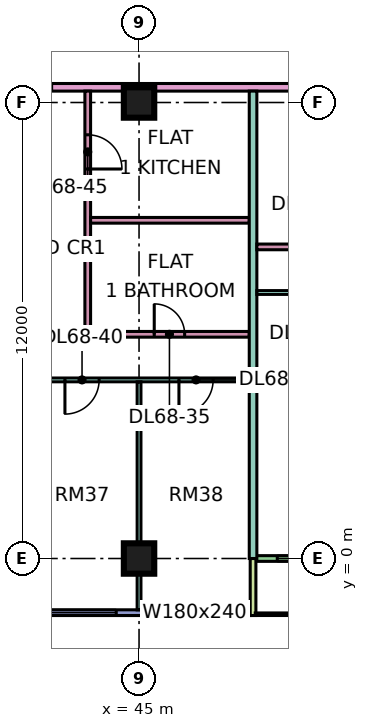
"""IFC4 building model, lengths in metres.
Left out: names, types, materials, properties, quantities, classifications, styles, units other than length and angle.
Written with IfcOpenShell. Run it as: python <this file> out.ifc"""

import sys

from ifc_helpers import new_model, si_unit, direction, frame, frame_2d, origin, origin_2d, place, context, subcontext, project, spatial, rectangle, extrude, element, fill, save


model = new_model("IFC4")
c1 = context("Model", 3, precision=1e-05, world=origin(), true_north=direction((0.0, 1.0)))
c2 = subcontext(c1, "Body", "Model", "MODEL_VIEW")
j1 = project(units=[si_unit("LENGTHUNIT", "METRE"), si_unit("PLANEANGLEUNIT", "RADIAN")], contexts=[c1])
p1 = place(None, origin())
s1 = spatial("IfcSite", under=j1, at=p1, CompositionType="ELEMENT")
p2 = place(p1, origin())
s2 = spatial("IfcBuilding", under=s1, at=p2, CompositionType="ELEMENT")
p3 = place(p2, frame((0.0, 0.0, 292.15)))
s3 = spatial("IfcBuildingStorey", under=s2, at=p3, CompositionType="ELEMENT", Elevation=292.15)
for number, where, z_axis, x_axis in (
    (1, (45.0, 0.0, 0.0), (0.0, 0.0, 1.0), (1.0, 0.0, 0.0)),
    (2, (45.0, 12.0, 0.0), (0.0, 0.0, 1.0), (1.0, 0.0, 0.0)),
):
    element("IfcColumn", number, at=place(p3, frame(where, z_axis=z_axis, x_axis=x_axis)), inside=s3, PredefinedType="COLUMN", context=c2, shape_type="SweptSolid", body=[
        extrude(rectangle(XDim=0.8, YDim=0.8, at=origin_2d()), origin(), (0.0, 0.0, 1.0), 3.75),
    ])
p4 = place(p3, frame((36.075, -1.425, 0.0), z_axis=(0.0, 0.0, 1.0), x_axis=(1.0, 0.0, 0.0)))
e3 = element("IfcWall", 3, at=p4, inside=s3, PredefinedType="SOLIDWALL", context=c2, shape_type="SweptSolid", body=[
    extrude(rectangle(XDim=11.85, YDim=0.15, at=frame_2d((5.925, 0.0))), origin(), (0.0, 0.0, 1.0), 3.35),
])
p5 = place(p4, frame((1.462, 0.0, 0.45)))
e4 = element("IfcOpeningElement", 4, at=p5, cuts=e3, PredefinedType="OPENING", context=c2, shape_type="SweptSolid", body=[
    extrude(rectangle(XDim=3.0, YDim=2.4, at=frame_2d((1.5, 1.2))), frame((0.0, 0.085, 0.0), z_axis=(0.0, -1.0, 0.0), x_axis=(1.0, 0.0, 0.0)), (0.0, 0.0, 1.0), 0.17),
])
p6 = place(p4, frame((6.525, 0.0, 0.45)))
e5 = element("IfcOpeningElement", 5, at=p6, cuts=e3, PredefinedType="OPENING", context=c2, shape_type="SweptSolid", body=[
    extrude(rectangle(XDim=1.8, YDim=2.4, at=frame_2d((0.9, 1.2))), frame((0.0, 0.085, 0.0), z_axis=(0.0, -1.0, 0.0), x_axis=(1.0, 0.0, 0.0)), (0.0, 0.0, 1.0), 0.17),
])
p7 = place(p4, frame((9.488, 0.0, 0.45)))
e6 = element("IfcOpeningElement", 6, at=p7, cuts=e3, PredefinedType="OPENING", context=c2, shape_type="SweptSolid", body=[
    extrude(rectangle(XDim=1.8, YDim=2.4, at=frame_2d((0.9, 1.2))), frame((0.0, 0.085, 0.0), z_axis=(0.0, -1.0, 0.0), x_axis=(1.0, 0.0, 0.0)), (0.0, 0.0, 1.0), 0.17),
])
p8 = place(p3, frame((48.075, 0.0, 0.0), z_axis=(0.0, 0.0, 1.0), x_axis=(1.0, 0.0, 0.0)))
e7 = element("IfcWall", 7, at=p8, inside=s3, PredefinedType="SOLIDWALL", context=c2, shape_type="SweptSolid", body=[
    extrude(rectangle(XDim=13.35, YDim=0.15, at=frame_2d((6.675, 0.0))), origin(), (0.0, 0.0, 1.0), 3.35),
])
p9 = place(p8, frame((0.562, 0.0, 0.45)))
e8 = element("IfcOpeningElement", 8, at=p9, cuts=e7, PredefinedType="OPENING", context=c2, shape_type="SweptSolid", body=[
    extrude(rectangle(XDim=1.8, YDim=2.4, at=frame_2d((0.9, 1.2))), frame((0.0, 0.085, 0.0), z_axis=(0.0, -1.0, 0.0), x_axis=(1.0, 0.0, 0.0)), (0.0, 0.0, 1.0), 0.17),
])
p10 = place(p8, frame((3.275, 0.0, 0.45)))
e9 = element("IfcOpeningElement", 9, at=p10, cuts=e7, PredefinedType="OPENING", context=c2, shape_type="SweptSolid", body=[
    extrude(rectangle(XDim=1.8, YDim=2.4, at=frame_2d((0.9, 1.2))), frame((0.0, 0.085, 0.0), z_axis=(0.0, -1.0, 0.0), x_axis=(1.0, 0.0, 0.0)), (0.0, 0.0, 1.0), 0.17),
])
p11 = place(p8, frame((8.275, 0.0, 0.0)))
e10 = element("IfcOpeningElement", 10, at=p11, cuts=e7, PredefinedType="OPENING", context=c2, shape_type="SweptSolid", body=[
    extrude(rectangle(XDim=1.8, YDim=2.4, at=frame_2d((0.9, 1.2))), frame((0.0, 0.085, 0.0), z_axis=(0.0, -1.0, 0.0), x_axis=(1.0, 0.0, 0.0)), (0.0, 0.0, 1.0), 0.17),
])
p12 = place(p8, frame((12.188, 0.0, 0.45)))
e11 = element("IfcOpeningElement", 11, at=p12, cuts=e7, PredefinedType="OPENING", context=c2, shape_type="SweptSolid", body=[
    extrude(rectangle(XDim=0.9, YDim=2.4, at=frame_2d((0.45, 1.2))), frame((0.0, 0.085, 0.0), z_axis=(0.0, -1.0, 0.0), x_axis=(1.0, 0.0, 0.0)), (0.0, 0.0, 1.0), 0.17),
])
p13 = place(p3, frame((48.0, -1.5, 0.0), z_axis=(0.0, 0.0, 1.0), x_axis=(0.0, 1.0, 0.0)))
e12 = element("IfcWall", 12, at=p13, inside=s3, PredefinedType="SOLIDWALL", context=c2, shape_type="SweptSolid", body=[
    extrude(rectangle(XDim=1.5, YDim=0.15, at=frame_2d((0.75, 0.0))), origin(), (0.0, 0.0, 1.0), 3.35),
])
p14 = place(p3, frame((33.05, 4.7, 0.0), z_axis=(0.0, 0.0, 1.0), x_axis=(1.0, 0.0, 0.0)))
e13 = element("IfcWall", 13, at=p14, inside=s3, PredefinedType="PARTITIONING", context=c2, shape_type="SweptSolid", body=[
    extrude(rectangle(XDim=14.85, YDim=0.1, at=frame_2d((7.425, 0.0))), origin(), (0.0, 0.0, 1.0), 3.35),
])
p15 = place(p14, frame((10.0, 0.0, 0.0)))
e14 = element("IfcOpeningElement", 14, at=p15, cuts=e13, PredefinedType="OPENING", context=c2, shape_type="SweptSolid", body=[
    extrude(rectangle(XDim=0.9, YDim=2.1, at=frame_2d((0.45, 1.05))), frame((0.0, 0.06, 0.0), z_axis=(0.0, -1.0, 0.0), x_axis=(1.0, 0.0, 0.0)), (0.0, 0.0, 1.0), 0.12),
])
p16 = place(p14, frame((13.0, 0.0, 0.0)))
e15 = element("IfcOpeningElement", 15, at=p16, cuts=e13, PredefinedType="OPENING", context=c2, shape_type="SweptSolid", body=[
    extrude(rectangle(XDim=0.9, YDim=2.1, at=frame_2d((0.45, 1.05))), frame((0.0, 0.06, 0.0), z_axis=(0.0, -1.0, 0.0), x_axis=(1.0, 0.0, 0.0)), (0.0, 0.0, 1.0), 0.12),
])
p17 = place(p14, frame((4.0, 0.0, 0.0)))
e16 = element("IfcOpeningElement", 16, at=p17, cuts=e13, PredefinedType="OPENING", context=c2, shape_type="SweptSolid", body=[
    extrude(rectangle(XDim=0.9, YDim=2.1, at=frame_2d((0.45, 1.05))), frame((0.0, 0.06, 0.0), z_axis=(0.0, -1.0, 0.0), x_axis=(1.0, 0.0, 0.0)), (0.0, 0.0, 1.0), 0.12),
])
p18 = place(p3, frame((40.65, 12.4, 0.0), z_axis=(0.0, 0.0, 1.0), x_axis=(1.0, 0.0, 0.0)))
e17 = element("IfcWall", 17, at=p18, inside=s3, PredefinedType="PARTITIONING", context=c2, shape_type="SweptSolid", body=[
    extrude(rectangle(XDim=22.35, YDim=0.2, at=frame_2d((11.175, 0.0))), origin(), (0.0, 0.0, 1.0), 3.35),
])
p19 = place(p18, frame((20.25, 0.0, 0.0)))
e18 = element("IfcOpeningElement", 18, at=p19, cuts=e17, PredefinedType="OPENING", context=c2, shape_type="SweptSolid", body=[
    extrude(rectangle(XDim=1.0, YDim=2.1, at=frame_2d((0.5, 1.05))), frame((0.0, 0.11, 0.0), z_axis=(0.0, -1.0, 0.0), x_axis=(1.0, 0.0, 0.0)), (0.0, 0.0, 1.0), 0.22),
])
p20 = place(p18, frame((1.05, 0.0, 0.0)))
e19 = element("IfcOpeningElement", 19, at=p20, cuts=e17, PredefinedType="OPENING", context=c2, shape_type="SweptSolid", body=[
    extrude(rectangle(XDim=1.0, YDim=2.1, at=frame_2d((0.5, 1.05))), frame((0.0, 0.11, 0.0), z_axis=(0.0, -1.0, 0.0), x_axis=(1.0, 0.0, 0.0)), (0.0, 0.0, 1.0), 0.22),
])
p21 = place(p3, frame((43.65, 5.825, 0.0), z_axis=(0.0, 0.0, 1.0), x_axis=(0.0, 1.0, 0.0)))
e20 = element("IfcWall", 20, at=p21, inside=s3, PredefinedType="PARTITIONING", context=c2, shape_type="SweptSolid", body=[
    extrude(rectangle(XDim=6.475, YDim=0.15, at=frame_2d((3.238, 0.0))), origin(), (0.0, 0.0, 1.0), 3.35),
])
p22 = place(p21, frame((4.425, 0.0, 0.0)))
e21 = element("IfcOpeningElement", 21, at=p22, cuts=e20, PredefinedType="OPENING", context=c2, shape_type="SweptSolid", body=[
    extrude(rectangle(XDim=0.9, YDim=2.1, at=frame_2d((0.45, 1.05))), frame((0.0, 0.085, 0.0), z_axis=(0.0, -1.0, 0.0), x_axis=(1.0, 0.0, 0.0)), (0.0, 0.0, 1.0), 0.17),
])
p23 = place(p3, frame((43.725, 5.9, 0.0), z_axis=(0.0, 0.0, 1.0), x_axis=(1.0, 0.0, 0.0)))
e22 = element("IfcWall", 22, at=p23, inside=s3, PredefinedType="PARTITIONING", context=c2, shape_type="SweptSolid", body=[
    extrude(rectangle(XDim=4.175, YDim=0.15, at=frame_2d((2.087, 0.0))), origin(), (0.0, 0.0, 1.0), 3.35),
])
p24 = place(p23, frame((1.675, 0.0, 0.0)))
e23 = element("IfcOpeningElement", 23, at=p24, cuts=e22, PredefinedType="OPENING", context=c2, shape_type="SweptSolid", body=[
    extrude(rectangle(XDim=0.8, YDim=2.1, at=frame_2d((0.4, 1.05))), frame((0.0, 0.085, 0.0), z_axis=(0.0, -1.0, 0.0), x_axis=(1.0, 0.0, 0.0)), (0.0, 0.0, 1.0), 0.17),
])
p25 = place(p3, frame((43.725, 8.9, 0.0), z_axis=(0.0, 0.0, 1.0), x_axis=(1.0, 0.0, 0.0)))
e24 = element("IfcWall", 24, at=p25, inside=s3, PredefinedType="PARTITIONING", context=c2, shape_type="SweptSolid", body=[
    extrude(rectangle(XDim=4.175, YDim=0.15, at=frame_2d((2.087, 0.0))), origin(), (0.0, 0.0, 1.0), 3.35),
])
p26 = place(p3, frame((45.0, -1.351, 0.0), z_axis=(0.0, 0.0, 1.0), x_axis=(0.0, 1.0, 0.0)))
e25 = element("IfcWall", 25, at=p26, inside=s3, PredefinedType="PARTITIONING", context=c2, shape_type="SweptSolid", body=[
    extrude(rectangle(XDim=6.001, YDim=0.1, at=frame_2d((3.0, 0.0))), origin(), (0.0, 0.0, 1.0), 3.35),
])
p27 = place(p3, frame((48.0, 0.0, 0.0), z_axis=(0.0, 0.0, 1.0), x_axis=(0.0, 1.0, 0.0)))
e26 = element("IfcWall", 26, at=p27, inside=s3, PredefinedType="PARTITIONING", context=c2, shape_type="SweptSolid", body=[
    extrude(rectangle(XDim=12.3, YDim=0.2, at=frame_2d((6.15, 0.0))), origin(), (0.0, 0.0, 1.0), 3.35),
])
p28 = place(p3, frame((48.1, 7.0, 0.0), z_axis=(0.0, 0.0, 1.0), x_axis=(1.0, 0.0, 0.0)))
e27 = element("IfcWall", 27, at=p28, inside=s3, PredefinedType="PARTITIONING", context=c2, shape_type="SweptSolid", body=[
    extrude(rectangle(XDim=5.85, YDim=0.1, at=frame_2d((2.925, 0.0))), origin(), (0.0, 0.0, 1.0), 3.35),
])
p29 = place(p28, frame((0.95, 0.0, 0.0)))
e28 = element("IfcOpeningElement", 28, at=p29, cuts=e27, PredefinedType="OPENING", context=c2, shape_type="SweptSolid", body=[
    extrude(rectangle(XDim=0.9, YDim=2.1, at=frame_2d((0.45, 1.05))), frame((0.0, 0.06, 0.0), z_axis=(0.0, -1.0, 0.0), x_axis=(1.0, 0.0, 0.0)), (0.0, 0.0, 1.0), 0.12),
])
p30 = place(p28, frame((3.95, 0.0, 0.0)))
e29 = element("IfcOpeningElement", 29, at=p30, cuts=e27, PredefinedType="OPENING", context=c2, shape_type="SweptSolid", body=[
    extrude(rectangle(XDim=0.9, YDim=2.1, at=frame_2d((0.45, 1.05))), frame((0.0, 0.06, 0.0), z_axis=(0.0, -1.0, 0.0), x_axis=(1.0, 0.0, 0.0)), (0.0, 0.0, 1.0), 0.12),
])
p31 = place(p3, frame((48.1, 8.2, 0.0), z_axis=(0.0, 0.0, 1.0), x_axis=(1.0, 0.0, 0.0)))
e30 = element("IfcWall", 30, at=p31, inside=s3, PredefinedType="PARTITIONING", context=c2, shape_type="SweptSolid", body=[
    extrude(rectangle(XDim=11.675, YDim=0.15, at=frame_2d((5.837, 0.0))), origin(), (0.0, 0.0, 1.0), 3.35),
])
p32 = place(p31, frame((9.75, 0.0, 0.0)))
e31 = element("IfcOpeningElement", 31, at=p32, cuts=e30, PredefinedType="OPENING", context=c2, shape_type="SweptSolid", body=[
    extrude(rectangle(XDim=0.8, YDim=2.1, at=frame_2d((0.4, 1.05))), frame((0.0, 0.085, 0.0), z_axis=(0.0, -1.0, 0.0), x_axis=(1.0, 0.0, 0.0)), (0.0, 0.0, 1.0), 0.17),
])
p33 = place(p31, frame((5.3, 0.0, 0.0)))
e32 = element("IfcOpeningElement", 32, at=p33, cuts=e30, PredefinedType="OPENING", context=c2, shape_type="SweptSolid", body=[
    extrude(rectangle(XDim=0.9, YDim=2.1, at=frame_2d((0.45, 1.05))), frame((0.0, 0.085, 0.0), z_axis=(0.0, -1.0, 0.0), x_axis=(1.0, 0.0, 0.0)), (0.0, 0.0, 1.0), 0.17),
])
p34 = place(p31, frame((1.05, 0.0, 0.0)))
e33 = element("IfcOpeningElement", 33, at=p34, cuts=e30, PredefinedType="OPENING", context=c2, shape_type="SweptSolid", body=[
    extrude(rectangle(XDim=0.8, YDim=2.1, at=frame_2d((0.4, 1.05))), frame((0.0, 0.085, 0.0), z_axis=(0.0, -1.0, 0.0), x_axis=(1.0, 0.0, 0.0)), (0.0, 0.0, 1.0), 0.17),
])
p35 = place(p6, origin())
e34 = element("IfcWindow", 34, at=p35, inside=s3, PartitioningType="SINGLE_PANEL", PredefinedType="WINDOW", context=c2, shape_type="SweptSolid", body=[
    extrude(rectangle(XDim=1.8, YDim=2.4, at=frame_2d((0.9, 1.2))), frame((0.0, 0.03, 0.0), z_axis=(0.0, -1.0, 0.0), x_axis=(1.0, 0.0, 0.0)), (0.0, 0.0, 1.0), 0.06),
])
fill(e5, e34)
p36 = place(p7, origin())
e35 = element("IfcWindow", 35, at=p36, inside=s3, PartitioningType="SINGLE_PANEL", PredefinedType="WINDOW", context=c2, shape_type="SweptSolid", body=[
    extrude(rectangle(XDim=1.8, YDim=2.4, at=frame_2d((0.9, 1.2))), frame((0.0, 0.03, 0.0), z_axis=(0.0, -1.0, 0.0), x_axis=(1.0, 0.0, 0.0)), (0.0, 0.0, 1.0), 0.06),
])
fill(e6, e35)
p37 = place(p9, origin())
e36 = element("IfcWindow", 36, at=p37, inside=s3, PartitioningType="SINGLE_PANEL", PredefinedType="WINDOW", context=c2, shape_type="SweptSolid", body=[
    extrude(rectangle(XDim=1.8, YDim=2.4, at=frame_2d((0.9, 1.2))), frame((0.0, 0.03, 0.0), z_axis=(0.0, -1.0, 0.0), x_axis=(1.0, 0.0, 0.0)), (0.0, 0.0, 1.0), 0.06),
])
fill(e8, e36)
p38 = place(p24, origin())
e37 = element("IfcDoor", 37, at=p38, inside=s3, OperationType="SINGLE_SWING_LEFT", PredefinedType="DOOR", context=c2, shape_type="SweptSolid", body=[
    extrude(rectangle(XDim=0.8, YDim=2.1, at=frame_2d((0.4, 1.05))), frame((0.0, 0.025, 0.0), z_axis=(0.0, -1.0, 0.0), x_axis=(1.0, 0.0, 0.0)), (0.0, 0.0, 1.0), 0.05),
])
fill(e23, e37)
p39 = place(p15, frame((0.9, 0.0, 0.0), z_axis=(0.0, 0.0, 1.0), x_axis=(-1.0, 0.0, 0.0)))
e38 = element("IfcDoor", 38, at=p39, inside=s3, OperationType="SINGLE_SWING_LEFT", PredefinedType="DOOR", context=c2, shape_type="SweptSolid", body=[
    extrude(rectangle(XDim=0.9, YDim=2.1, at=frame_2d((0.45, 1.05))), frame((0.0, 0.025, 0.0), z_axis=(0.0, -1.0, 0.0), x_axis=(1.0, 0.0, 0.0)), (0.0, 0.0, 1.0), 0.05),
])
fill(e14, e38)
p40 = place(p16, frame((0.9, 0.0, 0.0), z_axis=(0.0, 0.0, 1.0), x_axis=(-1.0, 0.0, 0.0)))
e39 = element("IfcDoor", 39, at=p40, inside=s3, OperationType="SINGLE_SWING_LEFT", PredefinedType="DOOR", context=c2, shape_type="SweptSolid", body=[
    extrude(rectangle(XDim=0.9, YDim=2.1, at=frame_2d((0.45, 1.05))), frame((0.0, 0.025, 0.0), z_axis=(0.0, -1.0, 0.0), x_axis=(1.0, 0.0, 0.0)), (0.0, 0.0, 1.0), 0.05),
])
fill(e15, e39)
p41 = place(p22, frame((0.9, 0.0, 0.0), z_axis=(0.0, 0.0, 1.0), x_axis=(-1.0, 0.0, 0.0)))
e40 = element("IfcDoor", 40, at=p41, inside=s3, OperationType="SINGLE_SWING_LEFT", PredefinedType="DOOR", context=c2, shape_type="SweptSolid", body=[
    extrude(rectangle(XDim=0.9, YDim=2.1, at=frame_2d((0.45, 1.05))), frame((0.0, 0.025, 0.0), z_axis=(0.0, -1.0, 0.0), x_axis=(1.0, 0.0, 0.0)), (0.0, 0.0, 1.0), 0.05),
])
fill(e21, e40)
save(model, sys.argv[1])
